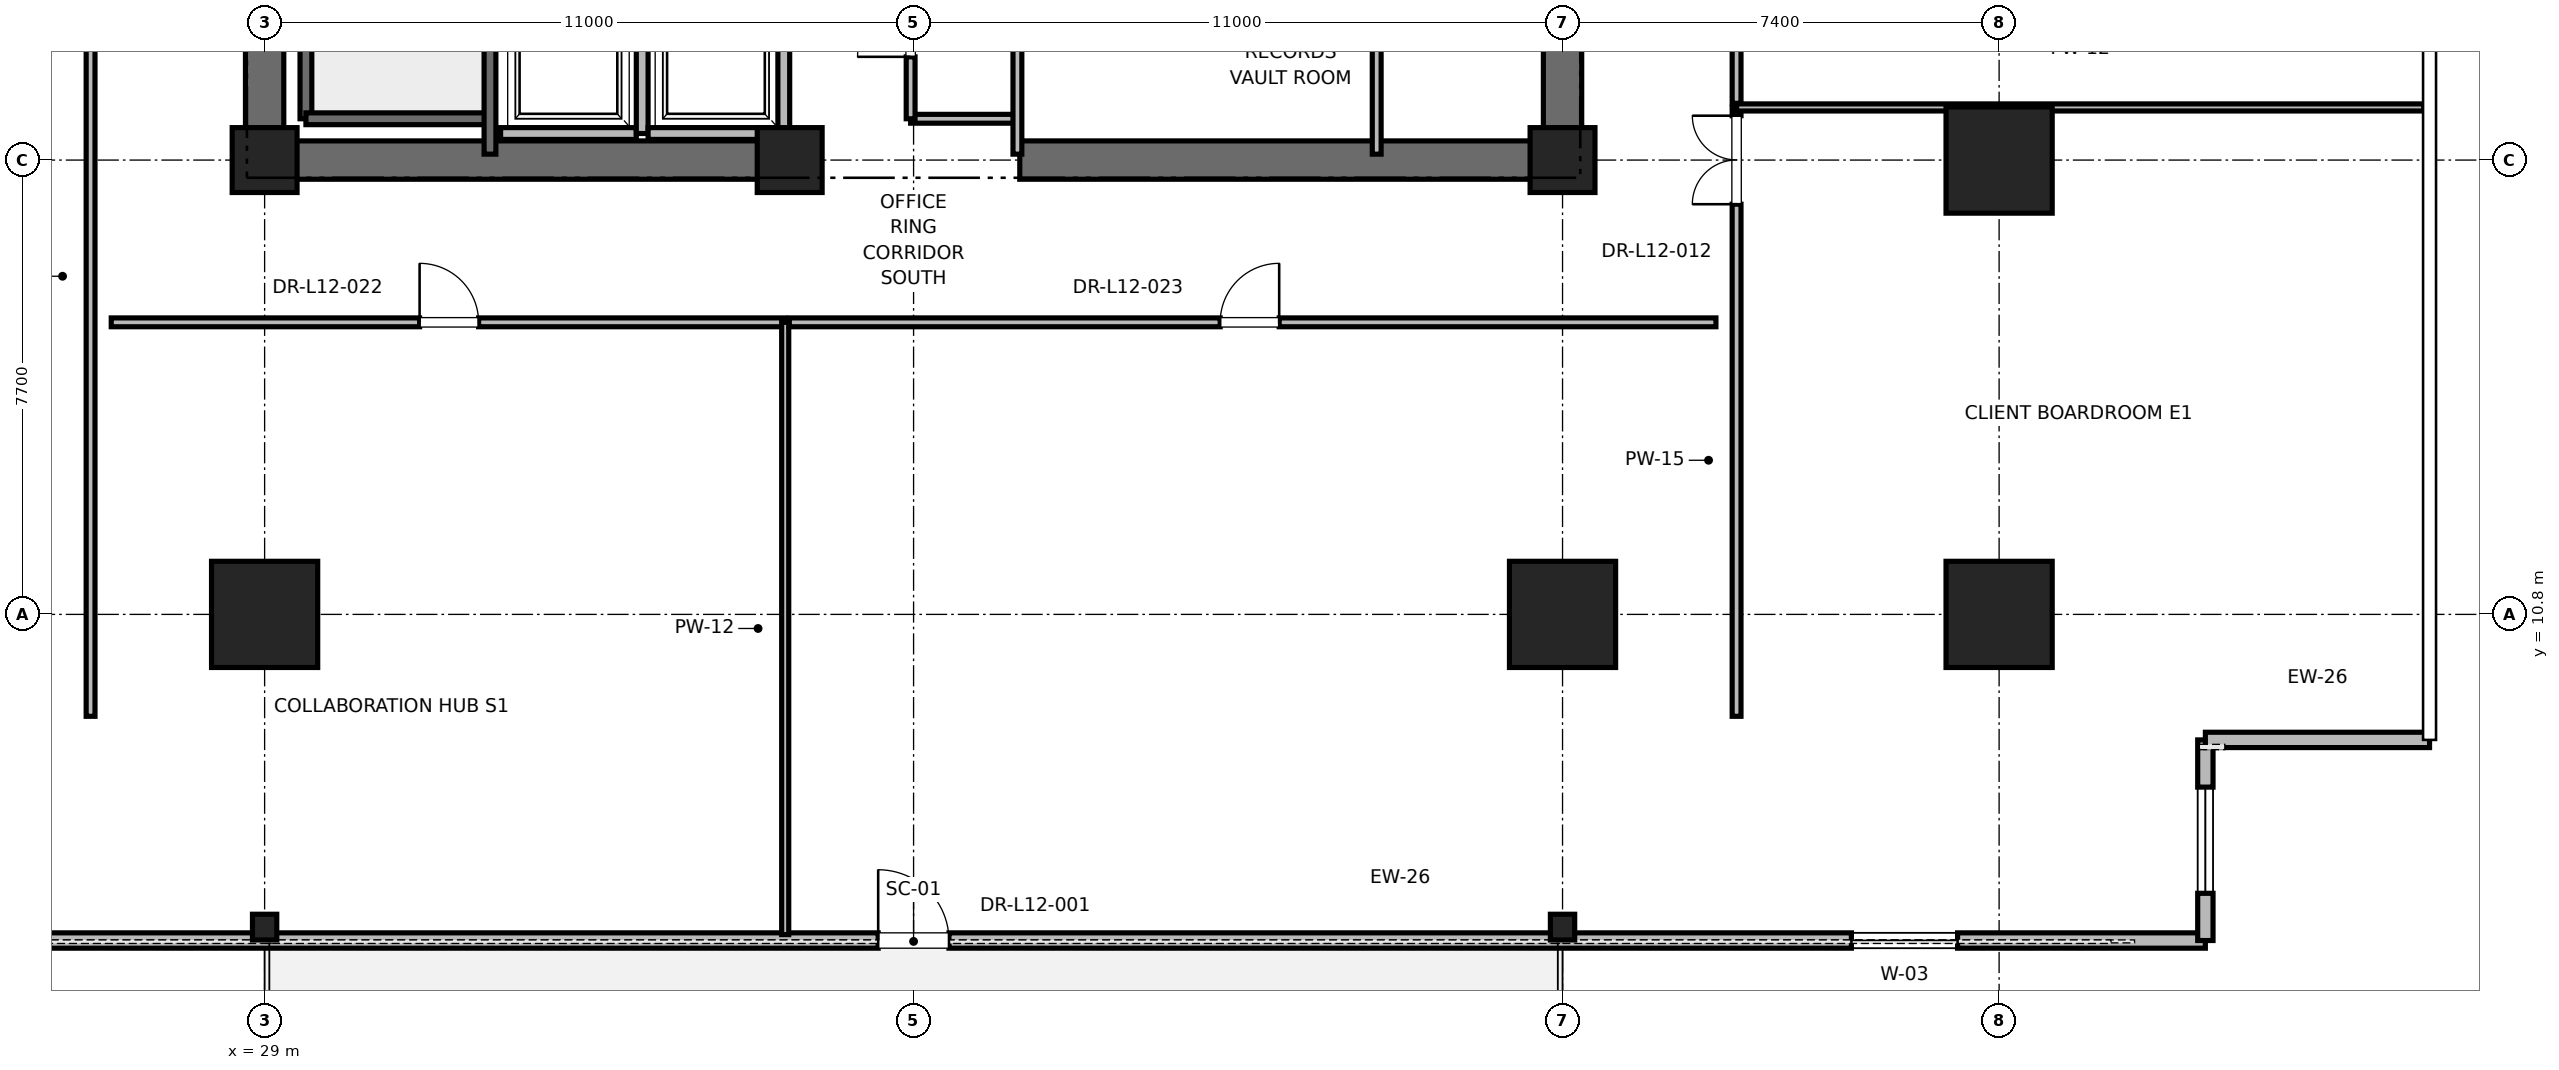
"""IFC4 building model, lengths in metres.
Left out: names, types, materials, properties, quantities, classifications, styles, units other than length and angle.
Written with IfcOpenShell. Run it as: python <this file> out.ifc"""

import sys

from ifc_helpers import new_model, si_unit, direction, frame, frame_2d, origin, origin_2d, place, context, subcontext, project, spatial, rectangle, i_section, extrude, element, fill, save


model = new_model("IFC4")
c1 = context("Model", 3, precision=1e-05, world=origin(), true_north=direction((0.0, 1.0)))
c2 = subcontext(c1, "Body", "Model", "MODEL_VIEW")
j1 = project(units=[si_unit("LENGTHUNIT", "METRE"), si_unit("PLANEANGLEUNIT", "RADIAN")], contexts=[c1])
p1 = place(None, origin())
s1 = spatial("IfcSite", under=j1, at=p1, CompositionType="ELEMENT")
p2 = place(p1, origin())
s2 = spatial("IfcBuilding", under=s1, at=p2, CompositionType="ELEMENT")
p3 = place(p2, frame((0.0, 0.0, 55.6)))
s3 = spatial("IfcBuildingStorey", under=s2, at=p3, CompositionType="ELEMENT", Elevation=55.6)
for number, where, z_axis, x_axis in (
    (1, (29.0, 10.8, 0.0), (0.0, 0.0, 1.0), (1.0, 0.0, 0.0)),
    (2, (51.0, 10.8, 0.0), (0.0, 0.0, 1.0), (1.0, 0.0, 0.0)),
    (3, (58.4, 18.5, 0.0), (0.0, 0.0, 1.0), (1.0, 0.0, 0.0)),
    (4, (58.4, 10.8, 0.0), (0.0, 0.0, 1.0), (1.0, 0.0, 0.0)),
):
    element("IfcColumn", number, at=place(p3, frame(where, z_axis=z_axis, x_axis=x_axis)), inside=s3, PredefinedType="COLUMN", context=c2, shape_type="SweptSolid", body=[
        extrude(rectangle(XDim=1.8, YDim=1.8, at=origin_2d()), origin(), (0.0, 0.0, 1.0), 4.0),
    ])
for number, where, z_axis, x_axis in (
    (5, (29.0, 5.5, 0.0), (0.0, 0.0, 1.0), (1.0, 0.0, 0.0)),
    (6, (51.0, 5.5, 0.0), (0.0, 0.0, 1.0), (1.0, 0.0, 0.0)),
):
    element("IfcColumn", number, at=place(p3, frame(where, z_axis=z_axis, x_axis=x_axis)), inside=s3, PredefinedType="COLUMN", context=c2, shape_type="SweptSolid", body=[
        extrude(i_section(OverallWidth=0.412, OverallDepth=0.437, WebThickness=0.036, FlangeThickness=0.058, FilletRadius=0.015, at=origin_2d()), origin(), (0.0, 0.0, 1.0), 4.0),
    ])
for number, where, z_axis, x_axis in (
    (7, (29.0, 18.5, 0.0), (0.0, 0.0, 1.0), (1.0, 0.0, 0.0)),
    (8, (51.0, 18.5, 0.0), (0.0, 0.0, 1.0), (1.0, 0.0, 0.0)),
    (9, (37.9, 18.5, 0.0), (0.0, 0.0, 1.0), (1.0, 0.0, 0.0)),
):
    element("IfcColumn", number, at=place(p3, frame(where, z_axis=z_axis, x_axis=x_axis)), inside=s3, PredefinedType="PILASTER", context=c2, shape_type="SweptSolid", body=[
        extrude(rectangle(XDim=1.1, YDim=1.1, at=origin_2d()), origin(), (0.0, 0.0, 1.0), 4.0),
    ])
for number, where, z_axis, x_axis in (
    (10, (29.0, 18.5, 0.0), (0.0, 0.0, 1.0), (1.0, 0.0, 0.0)),
    (11, (41.8, 18.5, 0.0), (0.0, 0.0, 1.0), (1.0, 0.0, 0.0)),
):
    element("IfcWall", number, at=place(p3, frame(where, z_axis=z_axis, x_axis=x_axis)), inside=s3, PredefinedType="SHEAR", context=c2, shape_type="SweptSolid", body=[
        extrude(rectangle(XDim=9.2, YDim=0.65, at=frame_2d((4.6, 0.0))), origin(), (0.0, 0.0, 1.0), 3.76),
    ])
p4 = place(p3, frame((29.0, 18.5, 0.0), z_axis=(0.0, 0.0, 1.0), x_axis=(0.0, 1.0, 0.0)))
e12 = element("IfcWall", 12, at=p4, inside=s3, PredefinedType="SHEAR", context=c2, shape_type="SweptSolid", body=[
    extrude(rectangle(XDim=8.8, YDim=0.65, at=frame_2d((4.4, 0.0))), origin(), (0.0, 0.0, 1.0), 3.76),
])
p5 = place(p3, frame((51.0, 18.5, 0.0), z_axis=(0.0, 0.0, 1.0), x_axis=(0.0, 1.0, 0.0)))
e13 = element("IfcWall", 13, at=p5, inside=s3, PredefinedType="SHEAR", context=c2, shape_type="SweptSolid", body=[
    extrude(rectangle(XDim=5.8, YDim=0.65, at=frame_2d((2.9, 0.0))), origin(), (0.0, 0.0, 1.0), 3.76),
])
p6 = place(p3, frame((18.104, 5.273, 0.0), z_axis=(0.0, 0.0, 1.0), x_axis=(1.0, 0.0, 0.0)))
e14 = element("IfcWall", 14, at=p6, inside=s3, PredefinedType="PARAPET", context=c2, shape_type="SweptSolid", body=[
    extrude(rectangle(XDim=43.792, YDim=0.26, at=frame_2d((21.896, 0.0))), origin(), (0.0, 0.0, 1.0), 2.889),
])
p7 = place(p6, frame((4.2, 0.0, 0.85)))
e15 = element("IfcOpeningElement", 15, at=p7, cuts=e14, PredefinedType="OPENING", context=c2, shape_type="SweptSolid", body=[
    extrude(rectangle(XDim=1.8, YDim=2.2, at=frame_2d((0.9, 1.1))), frame((0.0, 0.13, 0.0), z_axis=(0.0, -1.0, 0.0), x_axis=(1.0, 0.0, 0.0)), (0.0, 0.0, 1.0), 0.26),
])
p8 = place(p6, frame((21.296, 0.0, 0.0)))
e16 = element("IfcOpeningElement", 16, at=p8, cuts=e14, PredefinedType="OPENING", context=c2, shape_type="SweptSolid", body=[
    extrude(rectangle(XDim=1.2, YDim=2.2, at=frame_2d((0.6, 1.1))), frame((0.0, 0.13, 0.0), z_axis=(0.0, -1.0, 0.0), x_axis=(1.0, 0.0, 0.0)), (0.0, 0.0, 1.0), 0.26),
])
p9 = place(p6, frame((37.792, 0.0, 0.85)))
e17 = element("IfcOpeningElement", 17, at=p9, cuts=e14, PredefinedType="OPENING", context=c2, shape_type="SweptSolid", body=[
    extrude(rectangle(XDim=1.8, YDim=2.2, at=frame_2d((0.9, 1.1))), frame((0.0, 0.13, 0.0), z_axis=(0.0, -1.0, 0.0), x_axis=(1.0, 0.0, 0.0)), (0.0, 0.0, 1.0), 0.26),
])
p10 = place(p3, frame((61.896, 5.273, 0.0), z_axis=(0.0, 0.0, 1.0), x_axis=(0.0, 1.0, 0.0)))
e18 = element("IfcWall", 18, at=p10, inside=s3, PredefinedType="PARAPET", context=c2, shape_type="SweptSolid", body=[
    extrude(rectangle(XDim=3.4, YDim=0.26, at=frame_2d((1.7, 0.0))), origin(), (0.0, 0.0, 1.0), 3.76),
])
p11 = place(p10, frame((0.8, 0.0, 0.85)))
e19 = element("IfcOpeningElement", 19, at=p11, cuts=e18, PredefinedType="OPENING", context=c2, shape_type="SweptSolid", body=[
    extrude(rectangle(XDim=1.8, YDim=2.2, at=frame_2d((0.9, 1.1))), frame((0.0, 0.13, 0.0), z_axis=(0.0, -1.0, 0.0), x_axis=(1.0, 0.0, 0.0)), (0.0, 0.0, 1.0), 0.26),
])
p12 = place(p3, frame((61.896, 8.673, 0.0), z_axis=(0.0, 0.0, 1.0), x_axis=(1.0, 0.0, 0.0)))
e20 = element("IfcWall", 20, at=p12, inside=s3, PredefinedType="PARAPET", context=c2, shape_type="SweptSolid", body=[
    extrude(rectangle(XDim=3.8, YDim=0.26, at=frame_2d((1.9, 0.0))), origin(), (0.0, 0.0, 1.0), 3.76),
])
p13 = place(p3, frame((29.7, 19.2, 0.0), z_axis=(0.0, 0.0, 1.0), x_axis=(0.0, 1.0, 0.0)))
e21 = element("IfcWall", 21, at=p13, inside=s3, PredefinedType="SOLIDWALL", context=c2, shape_type="SweptSolid", body=[
    extrude(rectangle(XDim=8.15, YDim=0.2, at=frame_2d((4.075, 0.0))), origin(), (0.0, 0.0, 1.0), 3.76),
])
p14 = place(p3, frame((29.7, 19.2, 0.0), z_axis=(0.0, 0.0, 1.0), x_axis=(1.0, 0.0, 0.0)))
e22 = element("IfcWall", 22, at=p14, inside=s3, PredefinedType="SOLIDWALL", context=c2, shape_type="SweptSolid", body=[
    extrude(rectangle(XDim=3.12, YDim=0.2, at=frame_2d((1.56, 0.0))), origin(), (0.0, 0.0, 1.0), 3.76),
])
p15 = place(p3, frame((32.82, 18.6, 0.0), z_axis=(0.0, 0.0, 1.0), x_axis=(0.0, 1.0, 0.0)))
e23 = element("IfcWall", 23, at=p15, inside=s3, PredefinedType="SOLIDWALL", context=c2, shape_type="SweptSolid", body=[
    extrude(rectangle(XDim=8.78, YDim=0.2, at=frame_2d((4.39, 0.0))), origin(), (0.0, 0.0, 1.0), 3.76),
])
p16 = place(p3, frame((33.0, 18.95, 0.0), z_axis=(0.0, 0.0, 1.0), x_axis=(1.0, 0.0, 0.0)))
e24 = element("IfcWall", 24, at=p16, inside=s3, PredefinedType="SOLIDWALL", context=c2, shape_type="SweptSolid", body=[
    extrude(rectangle(XDim=2.3, YDim=0.2, at=frame_2d((1.15, 0.0))), origin(), (0.0, 0.0, 1.0), 3.76),
])
p17 = place(p3, frame((35.4, 18.95, 0.0), z_axis=(0.0, 0.0, 1.0), x_axis=(0.0, 1.0, 0.0)))
e25 = element("IfcWall", 25, at=p17, inside=s3, PredefinedType="SOLIDWALL", context=c2, shape_type="SweptSolid", body=[
    extrude(rectangle(XDim=2.6, YDim=0.2, at=frame_2d((1.3, 0.0))), origin(), (0.0, 0.0, 1.0), 3.76),
])
p18 = place(p3, frame((35.5, 18.95, 0.0), z_axis=(0.0, 0.0, 1.0), x_axis=(1.0, 0.0, 0.0)))
e26 = element("IfcWall", 26, at=p18, inside=s3, PredefinedType="SOLIDWALL", context=c2, shape_type="SweptSolid", body=[
    extrude(rectangle(XDim=2.3, YDim=0.2, at=frame_2d((1.15, 0.0))), origin(), (0.0, 0.0, 1.0), 2.54),
])
p19 = place(p3, frame((37.8, 18.95, 0.0), z_axis=(0.0, 0.0, 1.0), x_axis=(0.0, 1.0, 0.0)))
e27 = element("IfcWall", 27, at=p19, inside=s3, PredefinedType="SOLIDWALL", context=c2, shape_type="SweptSolid", body=[
    extrude(rectangle(XDim=2.6, YDim=0.2, at=frame_2d((1.3, 0.0))), origin(), (0.0, 0.0, 1.0), 2.54),
])
p20 = place(p3, frame((39.95, 19.2, 0.0), z_axis=(0.0, 0.0, 1.0), x_axis=(1.0, 0.0, 0.0)))
e28 = element("IfcWall", 28, at=p20, inside=s3, PredefinedType="PARTITIONING", context=c2, shape_type="SweptSolid", body=[
    extrude(rectangle(XDim=1.81, YDim=0.15, at=frame_2d((0.905, 0.0))), origin(), (0.0, 0.0, 1.0), 2.85),
])
p21 = place(p3, frame((41.76, 18.6, 0.0), z_axis=(0.0, 0.0, 1.0), x_axis=(0.0, 1.0, 0.0)))
e29 = element("IfcWall", 29, at=p21, inside=s3, PredefinedType="PARTITIONING", context=c2, shape_type="SweptSolid", body=[
    extrude(rectangle(XDim=3.6, YDim=0.15, at=frame_2d((1.8, 0.0))), origin(), (0.0, 0.0, 1.0), 2.54),
])
p22 = place(p3, frame((39.95, 19.2, 0.0), z_axis=(0.0, 0.0, 1.0), x_axis=(0.0, 1.0, 0.0)))
e30 = element("IfcWall", 30, at=p22, inside=s3, PredefinedType="PARTITIONING", context=c2, shape_type="SweptSolid", body=[
    extrude(rectangle(XDim=3.0, YDim=0.15, at=frame_2d((1.5, 0.0))), origin(), (0.0, 0.0, 1.0), 2.85),
])
p23 = place(p22, frame((1.05, 0.0, 0.0)))
e31 = element("IfcOpeningElement", 31, at=p23, cuts=e30, PredefinedType="OPENING", context=c2, shape_type="SweptSolid", body=[
    extrude(rectangle(XDim=0.9, YDim=2.1, at=frame_2d((0.45, 1.05))), frame((0.0, 0.075, 0.0), z_axis=(0.0, -1.0, 0.0), x_axis=(1.0, 0.0, 0.0)), (0.0, 0.0, 1.0), 0.15),
])
p24 = place(p3, frame((47.85, 18.6, 0.0), z_axis=(0.0, 0.0, 1.0), x_axis=(0.0, 1.0, 0.0)))
e32 = element("IfcWall", 32, at=p24, inside=s3, PredefinedType="PARTITIONING", context=c2, shape_type="SweptSolid", body=[
    extrude(rectangle(XDim=2.54, YDim=0.15, at=frame_2d((1.27, 0.0))), origin(), (0.0, 0.0, 1.0), 2.85),
])
p25 = place(p3, frame((26.4, 15.75, 0.0), z_axis=(0.0, 0.0, 1.0), x_axis=(1.0, 0.0, 0.0)))
e33 = element("IfcWall", 33, at=p25, inside=s3, PredefinedType="PARTITIONING", context=c2, shape_type="SweptSolid", body=[
    extrude(rectangle(XDim=11.424, YDim=0.15, at=frame_2d((5.712, 0.0))), origin(), (0.0, 0.0, 1.0), 2.85),
])
p26 = place(p25, frame((5.227, 0.0, 0.0)))
e34 = element("IfcOpeningElement", 34, at=p26, cuts=e33, PredefinedType="OPENING", context=c2, shape_type="SweptSolid", body=[
    extrude(rectangle(XDim=1.0, YDim=2.15, at=frame_2d((0.5, 1.075))), frame((0.0, 0.075, 0.0), z_axis=(0.0, -1.0, 0.0), x_axis=(1.0, 0.0, 0.0)), (0.0, 0.0, 1.0), 0.15),
])
p27 = place(p3, frame((37.824, 5.373, 0.0), z_axis=(0.0, 0.0, 1.0), x_axis=(0.0, 1.0, 0.0)))
e35 = element("IfcWall", 35, at=p27, inside=s3, PredefinedType="PARTITIONING", context=c2, shape_type="SweptSolid", body=[
    extrude(rectangle(XDim=10.377, YDim=0.12, at=frame_2d((5.188, 0.0))), origin(), (0.0, 0.0, 1.0), 2.39),
])
p28 = place(p3, frame((37.894, 15.75, 0.0), z_axis=(0.0, 0.0, 1.0), x_axis=(1.0, 0.0, 0.0)))
e36 = element("IfcWall", 36, at=p28, inside=s3, PredefinedType="PARTITIONING", context=c2, shape_type="SweptSolid", body=[
    extrude(rectangle(XDim=15.706, YDim=0.15, at=frame_2d((7.853, 0.0))), origin(), (0.0, 0.0, 1.0), 2.85),
])
p29 = place(p28, frame((7.303, 0.0, 0.0)))
e37 = element("IfcOpeningElement", 37, at=p29, cuts=e36, PredefinedType="OPENING", context=c2, shape_type="SweptSolid", body=[
    extrude(rectangle(XDim=1.0, YDim=2.15, at=frame_2d((0.5, 1.075))), frame((0.0, 0.075, 0.0), z_axis=(0.0, -1.0, 0.0), x_axis=(1.0, 0.0, 0.0)), (0.0, 0.0, 1.0), 0.15),
])
p30 = place(p3, frame((26.05, 9.073, 0.0), z_axis=(0.0, 0.0, 1.0), x_axis=(0.0, 1.0, 0.0)))
e38 = element("IfcWall", 38, at=p30, inside=s3, PredefinedType="PARTITIONING", context=c2, shape_type="SweptSolid", body=[
    extrude(rectangle(XDim=21.376, YDim=0.15, at=frame_2d((10.688, 0.0))), origin(), (0.0, 0.0, 1.0), 2.85),
])
p31 = place(p30, frame((14.917, 0.0, 0.0)))
e39 = element("IfcOpeningElement", 39, at=p31, cuts=e38, PredefinedType="OPENING", context=c2, shape_type="SweptSolid", body=[
    extrude(rectangle(XDim=1.0, YDim=2.15, at=frame_2d((0.5, 1.075))), frame((0.0, 0.075, 0.0), z_axis=(0.0, -1.0, 0.0), x_axis=(1.0, 0.0, 0.0)), (0.0, 0.0, 1.0), 0.15),
])
p32 = place(p3, frame((53.95, 9.073, 0.0), z_axis=(0.0, 0.0, 1.0), x_axis=(0.0, 1.0, 0.0)))
e40 = element("IfcWall", 40, at=p32, inside=s3, PredefinedType="PARTITIONING", context=c2, shape_type="SweptSolid", body=[
    extrude(rectangle(XDim=10.319, YDim=0.15, at=frame_2d((5.16, 0.0))), origin(), (0.0, 0.0, 1.0), 2.85),
])
p33 = place(p32, frame((8.679, 0.0, 0.0)))
e41 = element("IfcOpeningElement", 41, at=p33, cuts=e40, PredefinedType="OPENING", context=c2, shape_type="SweptSolid", body=[
    extrude(rectangle(XDim=1.5, YDim=2.25, at=frame_2d((0.75, 1.125))), frame((0.0, 0.075, 0.0), z_axis=(0.0, -1.0, 0.0), x_axis=(1.0, 0.0, 0.0)), (0.0, 0.0, 1.0), 0.15),
])
p34 = place(p3, frame((53.95, 19.392, 0.0), z_axis=(0.0, 0.0, 1.0), x_axis=(1.0, 0.0, 0.0)))
e42 = element("IfcWall", 42, at=p34, inside=s3, PredefinedType="PARTITIONING", context=c2, shape_type="SweptSolid", body=[
    extrude(rectangle(XDim=11.646, YDim=0.12, at=frame_2d((5.823, 0.0))), origin(), (0.0, 0.0, 1.0), 2.85),
])
p35 = place(p3, frame((53.95, 19.462, 0.0), z_axis=(0.0, 0.0, 1.0), x_axis=(0.0, 1.0, 0.0)))
e43 = element("IfcWall", 43, at=p35, inside=s3, PredefinedType="PARTITIONING", context=c2, shape_type="SweptSolid", body=[
    extrude(rectangle(XDim=12.461, YDim=0.15, at=frame_2d((6.23, 0.0))), origin(), (0.0, 0.0, 1.0), 2.85),
])
p36 = place(p35, frame((5.695, 0.0, 0.0)))
e44 = element("IfcOpeningElement", 44, at=p36, cuts=e43, PredefinedType="OPENING", context=c2, shape_type="SweptSolid", body=[
    extrude(rectangle(XDim=1.0, YDim=2.15, at=frame_2d((0.5, 1.075))), frame((0.0, 0.075, 0.0), z_axis=(0.0, -1.0, 0.0), x_axis=(1.0, 0.0, 0.0)), (0.0, 0.0, 1.0), 0.15),
])
p37 = place(p8, origin())
e45 = element("IfcDoor", 45, at=p37, inside=s3, OperationType="SINGLE_SWING_LEFT", PredefinedType="DOOR", context=c2, shape_type="SweptSolid", body=[
    extrude(rectangle(XDim=1.2, YDim=2.2, at=frame_2d((0.6, 1.1))), frame((0.0, 0.025, 0.0), z_axis=(0.0, -1.0, 0.0), x_axis=(1.0, 0.0, 0.0)), (0.0, 0.0, 1.0), 0.05),
])
fill(e16, e45)
p38 = place(p9, origin())
e46 = element("IfcWindow", 46, at=p38, inside=s3, PartitioningType="SINGLE_PANEL", PredefinedType="WINDOW", context=c2, shape_type="SweptSolid", body=[
    extrude(rectangle(XDim=1.8, YDim=2.2, at=frame_2d((0.9, 1.1))), frame((0.0, 0.03, 0.0), z_axis=(0.0, -1.0, 0.0), x_axis=(1.0, 0.0, 0.0)), (0.0, 0.0, 1.0), 0.06),
])
fill(e17, e46)
p39 = place(p11, origin())
e47 = element("IfcWindow", 47, at=p39, inside=s3, PartitioningType="SINGLE_PANEL", PredefinedType="WINDOW", context=c2, shape_type="SweptSolid", body=[
    extrude(rectangle(XDim=1.8, YDim=2.2, at=frame_2d((0.9, 1.1))), frame((0.0, 0.03, 0.0), z_axis=(0.0, -1.0, 0.0), x_axis=(1.0, 0.0, 0.0)), (0.0, 0.0, 1.0), 0.06),
])
fill(e19, e47)
p40 = place(p23, origin())
e48 = element("IfcDoor", 48, at=p40, inside=s3, OperationType="SINGLE_SWING_LEFT", PredefinedType="DOOR", context=c2, shape_type="SweptSolid", body=[
    extrude(rectangle(XDim=0.9, YDim=2.1, at=frame_2d((0.45, 1.05))), frame((0.0, 0.025, 0.0), z_axis=(0.0, -1.0, 0.0), x_axis=(1.0, 0.0, 0.0)), (0.0, 0.0, 1.0), 0.05),
])
fill(e31, e48)
p41 = place(p26, origin())
e49 = element("IfcDoor", 49, at=p41, inside=s3, OperationType="SINGLE_SWING_LEFT", PredefinedType="DOOR", context=c2, shape_type="SweptSolid", body=[
    extrude(rectangle(XDim=1.0, YDim=2.15, at=frame_2d((0.5, 1.075))), frame((0.0, 0.025, 0.0), z_axis=(0.0, -1.0, 0.0), x_axis=(1.0, 0.0, 0.0)), (0.0, 0.0, 1.0), 0.05),
])
fill(e34, e49)
p42 = place(p29, origin())
e50 = element("IfcDoor", 50, at=p42, inside=s3, OperationType="SINGLE_SWING_RIGHT", PredefinedType="DOOR", context=c2, shape_type="SweptSolid", body=[
    extrude(rectangle(XDim=1.0, YDim=2.15, at=frame_2d((0.5, 1.075))), frame((0.0, 0.025, 0.0), z_axis=(0.0, -1.0, 0.0), x_axis=(1.0, 0.0, 0.0)), (0.0, 0.0, 1.0), 0.05),
])
fill(e37, e50)
p43 = place(p33, origin())
e51 = element("IfcDoor", 51, at=p43, inside=s3, OperationType="DOUBLE_DOOR_SINGLE_SWING", PredefinedType="DOOR", context=c2, shape_type="SweptSolid", body=[
    extrude(rectangle(XDim=1.5, YDim=2.25, at=frame_2d((0.75, 1.125))), frame((0.0, 0.025, 0.0), z_axis=(0.0, -1.0, 0.0), x_axis=(1.0, 0.0, 0.0)), (0.0, 0.0, 1.0), 0.05),
])
fill(e41, e51)
save(model, sys.argv[1])
